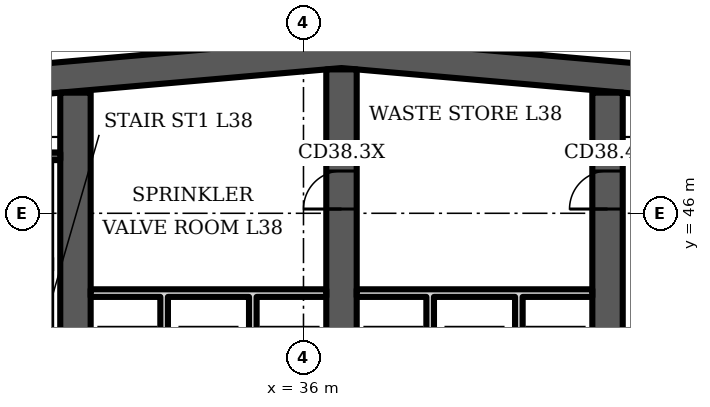
"""IFC4 building model, lengths in metres.
Left out: names, types, materials, properties, quantities, classifications, styles, units other than length and angle.
Written with IfcOpenShell. Run it as: python <this file> out.ifc"""

import sys

from ifc_helpers import new_model, si_unit, direction, frame, frame_2d, origin, place, context, subcontext, project, spatial, polyline, rectangle, outline, extrude, element, fill, save


model = new_model("IFC4")
c1 = context("Model", 3, precision=1e-05, world=origin(), true_north=direction((0.0, 1.0)))
c2 = subcontext(c1, "Body", "Model", "MODEL_VIEW")
j1 = project(units=[si_unit("LENGTHUNIT", "METRE"), si_unit("PLANEANGLEUNIT", "RADIAN")], contexts=[c1])
p1 = place(None, origin())
s1 = spatial("IfcSite", under=j1, at=p1, CompositionType="ELEMENT")
p2 = place(p1, origin())
s2 = spatial("IfcBuilding", under=s1, at=p2, CompositionType="ELEMENT")
p3 = place(p2, frame((0.0, 0.0, 159.1)))
s3 = spatial("IfcBuildingStorey", under=s2, at=p3, CompositionType="ELEMENT", Elevation=159.1)
p4 = place(p3, frame((0.0, 0.0, -0.0)))
e1 = element("IfcWall", 1, at=p4, inside=s3, PredefinedType="SHEAR", context=c2, shape_type="SweptSolid", body=[
    extrude(outline(polyline([(16.0, 47.984), (37.0, 49.822), (58.0, 47.984), (58.0, 48.787), (37.0, 50.625), (16.0, 48.787), (16.0, 47.984)])), origin(), (0.0, 0.0, 1.0), 3.6),
])
p5 = place(p3, frame((30.0, 34.8, 0.0), z_axis=(0.0, 0.0, 1.0), x_axis=(0.0, 1.0, 0.0)))
e2 = element("IfcWall", 2, at=p5, inside=s3, PredefinedType="SHEAR", context=c2, shape_type="SweptSolid", body=[
    extrude(rectangle(XDim=14.374, YDim=0.8, at=frame_2d((7.187, 0.0))), origin(), (0.0, 0.0, 1.0), 3.6),
])
p6 = place(p5, frame((3.6, 0.0, 0.0)))
e3 = element("IfcOpeningElement", 3, at=p6, cuts=e2, PredefinedType="OPENING", context=c2, shape_type="SweptSolid", body=[
    extrude(rectangle(XDim=1.1, YDim=2.1, at=frame_2d((0.55, 1.05))), frame((0.0, 0.41, 0.0), z_axis=(0.0, -1.0, 0.0), x_axis=(1.0, 0.0, 0.0)), (0.0, 0.0, 1.0), 0.82),
])
p7 = place(p3, frame((37.0, 34.8, 0.0), z_axis=(0.0, 0.0, 1.0), x_axis=(0.0, 1.0, 0.0)))
e4 = element("IfcWall", 4, at=p7, inside=s3, PredefinedType="SHEAR", context=c2, shape_type="SweptSolid", body=[
    extrude(rectangle(XDim=14.987, YDim=0.8, at=frame_2d((7.493, 0.0))), origin(), (0.0, 0.0, 1.0), 3.6),
])
p8 = place(p7, frame((11.312, 0.0, 0.0)))
e5 = element("IfcOpeningElement", 5, at=p8, cuts=e4, PredefinedType="OPENING", context=c2, shape_type="SweptSolid", body=[
    extrude(rectangle(XDim=1.0, YDim=2.1, at=frame_2d((0.5, 1.05))), frame((0.0, 0.41, 0.0), z_axis=(0.0, -1.0, 0.0), x_axis=(1.0, 0.0, 0.0)), (0.0, 0.0, 1.0), 0.82),
])
p9 = place(p7, frame((3.6, 0.0, 0.0)))
e6 = element("IfcOpeningElement", 6, at=p9, cuts=e4, PredefinedType="OPENING", context=c2, shape_type="SweptSolid", body=[
    extrude(rectangle(XDim=1.1, YDim=2.1, at=frame_2d((0.55, 1.05))), frame((0.0, 0.41, 0.0), z_axis=(0.0, -1.0, 0.0), x_axis=(1.0, 0.0, 0.0)), (0.0, 0.0, 1.0), 0.82),
])
p10 = place(p3, frame((44.0, 34.8, 0.0), z_axis=(0.0, 0.0, 1.0), x_axis=(0.0, 1.0, 0.0)))
e7 = element("IfcWall", 7, at=p10, inside=s3, PredefinedType="SHEAR", context=c2, shape_type="SweptSolid", body=[
    extrude(rectangle(XDim=14.374, YDim=0.8, at=frame_2d((7.187, 0.0))), origin(), (0.0, 0.0, 1.0), 3.6),
])
p11 = place(p10, frame((11.312, 0.0, 0.0)))
e8 = element("IfcOpeningElement", 8, at=p11, cuts=e7, PredefinedType="OPENING", context=c2, shape_type="SweptSolid", body=[
    extrude(rectangle(XDim=1.0, YDim=2.1, at=frame_2d((0.5, 1.05))), frame((0.0, 0.41, 0.0), z_axis=(0.0, -1.0, 0.0), x_axis=(1.0, 0.0, 0.0)), (0.0, 0.0, 1.0), 0.82),
])
p12 = place(p10, frame((3.6, 0.0, 0.0)))
e9 = element("IfcOpeningElement", 9, at=p12, cuts=e7, PredefinedType="OPENING", context=c2, shape_type="SweptSolid", body=[
    extrude(rectangle(XDim=1.1, YDim=2.1, at=frame_2d((0.55, 1.05))), frame((0.0, 0.41, 0.0), z_axis=(0.0, -1.0, 0.0), x_axis=(1.0, 0.0, 0.0)), (0.0, 0.0, 1.0), 0.82),
])
p13 = place(p3, frame((25.75, 47.5, 0.0), z_axis=(0.0, 0.0, 1.0), x_axis=(1.0, 0.0, 0.0)))
e10 = element("IfcWall", 10, at=p13, inside=s3, PredefinedType="SHEAR", context=c2, shape_type="SweptSolid", body=[
    extrude(rectangle(XDim=3.85, YDim=0.2, at=frame_2d((1.925, 0.0))), origin(), (0.0, 0.0, 1.0), 3.2),
])
p14 = place(p3, frame((0.0, 0.0, -0.0)))
e11 = element("IfcWall", 11, at=p14, inside=s3, PredefinedType="PARTITIONING", context=c2, shape_type="SweptSolid", body=[
    extrude(outline(polyline([(32.433, 40.8), (32.233, 40.8), (32.233, 43.8), (30.4, 43.8), (30.4, 44.0), (36.6, 44.0), (36.6, 43.8), (34.767, 43.8), (34.767, 40.8), (34.567, 40.8), (34.567, 43.8), (32.433, 43.8), (32.433, 40.8)])), origin(), (0.0, 0.0, 1.0), 3.2),
])
p15 = place(p3, frame((0.0, 0.0, -0.0)))
e12 = element("IfcWall", 12, at=p15, inside=s3, PredefinedType="PARTITIONING", context=c2, shape_type="SweptSolid", body=[
    extrude(outline(polyline([(39.433, 40.8), (39.233, 40.8), (39.233, 43.8), (37.4, 43.8), (37.4, 44.0), (43.6, 44.0), (43.6, 43.8), (41.767, 43.8), (41.767, 40.8), (41.567, 40.8), (41.567, 43.8), (39.433, 43.8), (39.433, 40.8)])), origin(), (0.0, 0.0, 1.0), 3.2),
])
p16 = place(p8, origin())
e13 = element("IfcDoor", 13, at=p16, inside=s3, OperationType="SINGLE_SWING_LEFT", PredefinedType="DOOR", context=c2, shape_type="SweptSolid", body=[
    extrude(rectangle(XDim=1.0, YDim=2.1, at=frame_2d((0.5, 1.05))), frame((0.0, 0.4, 0.0), z_axis=(0.0, -1.0, 0.0), x_axis=(1.0, 0.0, 0.0)), (0.0, 0.0, 1.0), 0.8),
])
fill(e5, e13)
p17 = place(p11, origin())
e14 = element("IfcDoor", 14, at=p17, inside=s3, OperationType="SINGLE_SWING_LEFT", PredefinedType="DOOR", context=c2, shape_type="SweptSolid", body=[
    extrude(rectangle(XDim=1.0, YDim=2.1, at=frame_2d((0.5, 1.05))), frame((0.0, 0.4, 0.0), z_axis=(0.0, -1.0, 0.0), x_axis=(1.0, 0.0, 0.0)), (0.0, 0.0, 1.0), 0.8),
])
fill(e8, e14)
save(model, sys.argv[1])
